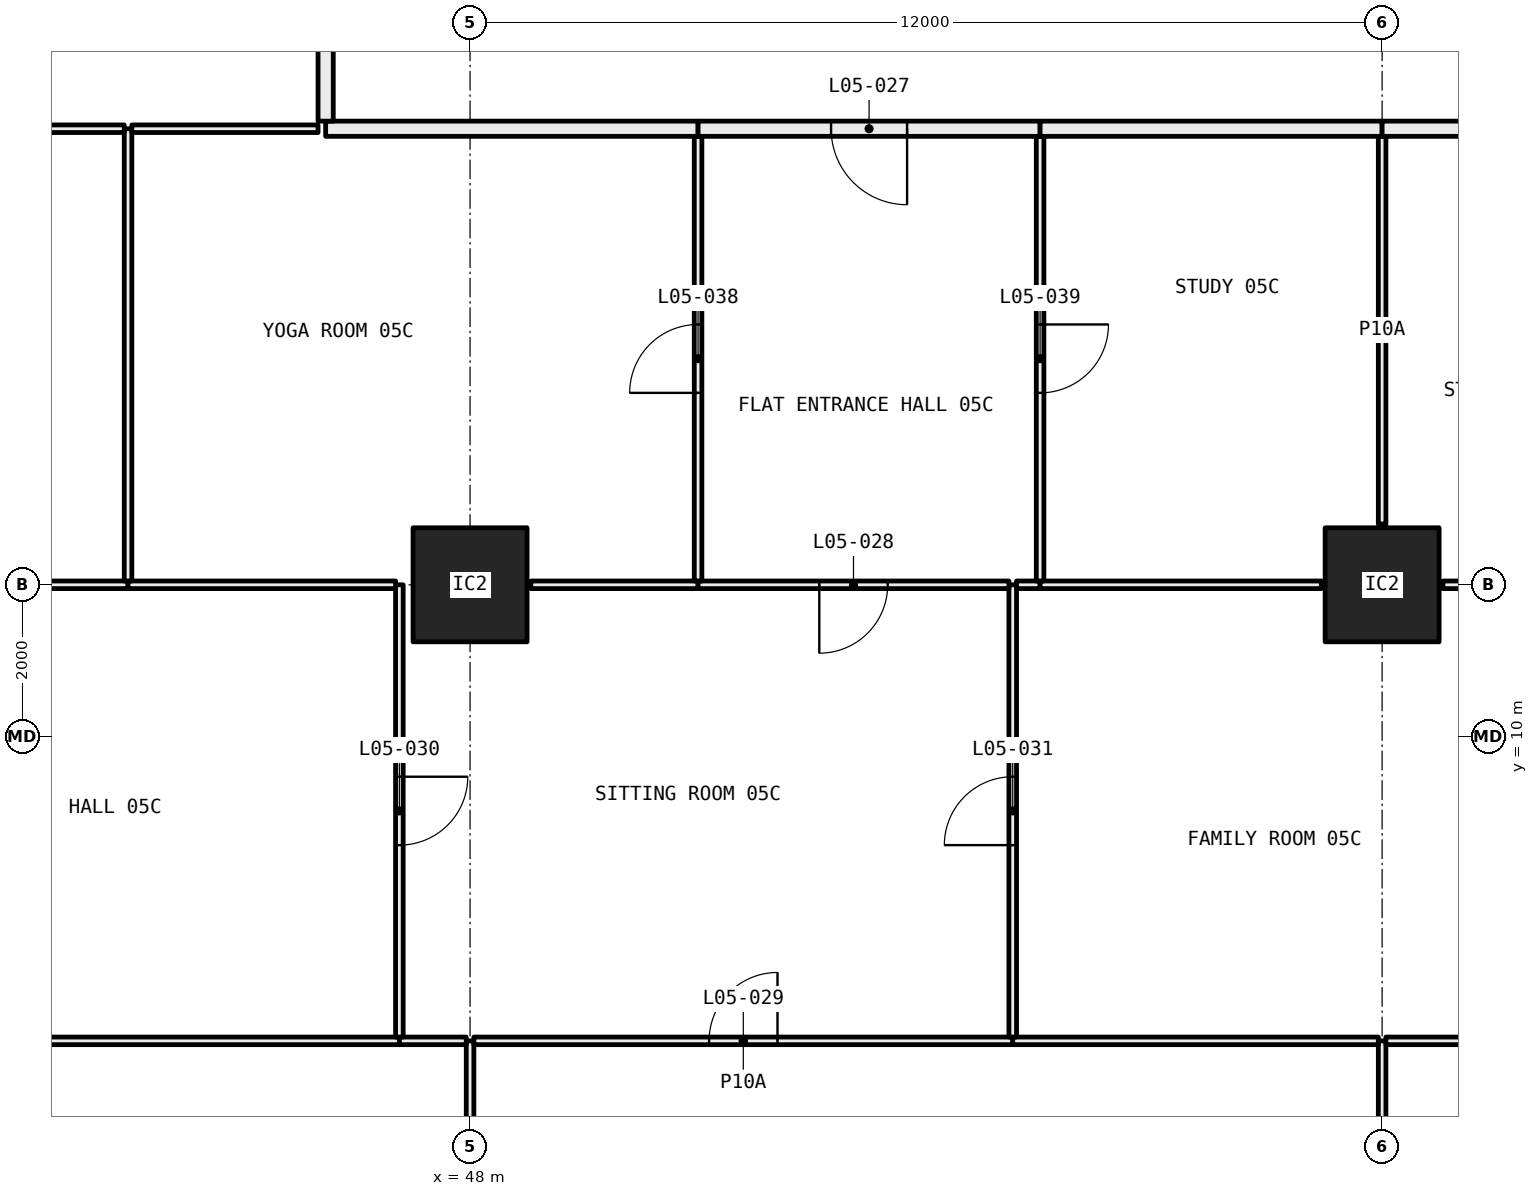
"""IFC4 building model, lengths in metres.
Left out: names, types, materials, properties, quantities, classifications, styles, units other than length and angle.
Written with IfcOpenShell. Run it as: python <this file> out.ifc"""

import sys

from ifc_helpers import new_model, si_unit, direction, frame, frame_2d, origin, origin_2d, place, context, subcontext, project, spatial, rectangle, hollow_rectangle, extrude, element, fill, save


model = new_model("IFC4")
c1 = context("Model", 3, precision=1e-05, world=origin(), true_north=direction((0.0, 1.0)))
c2 = subcontext(c1, "Body", "Model", "MODEL_VIEW")
j1 = project(units=[si_unit("LENGTHUNIT", "METRE"), si_unit("PLANEANGLEUNIT", "RADIAN")], contexts=[c1])
p1 = place(None, origin())
s1 = spatial("IfcSite", under=j1, at=p1, CompositionType="ELEMENT")
p2 = place(p1, origin())
s2 = spatial("IfcBuilding", under=s1, at=p2, CompositionType="ELEMENT")
p3 = place(p2, frame((0.0, 0.0, 30.0)))
s3 = spatial("IfcBuildingStorey", under=s2, at=p3, CompositionType="ELEMENT", Elevation=30.0)
for number, where, z_axis, x_axis in (
    (1, (48.0, 12.0, 0.0), (0.0, 0.0, 1.0), (1.0, 0.0, 0.0)),
    (2, (60.0, 12.0, 0.0), (0.0, 0.0, 1.0), (1.0, 0.0, 0.0)),
):
    element("IfcColumn", number, at=place(p3, frame(where, z_axis=z_axis, x_axis=x_axis)), inside=s3, PredefinedType="COLUMN", context=c2, shape_type="SweptSolid", body=[
        extrude(hollow_rectangle(XDim=1.5, YDim=1.5, WallThickness=0.065, at=origin_2d()), origin(), (0.0, 0.0, 1.0), 3.05),
    ])
p4 = place(p3, frame((48.0, 0.72, 0.0), z_axis=(0.0, 0.0, 1.0), x_axis=(0.0, 1.0, 0.0)))
e3 = element("IfcWall", 3, at=p4, inside=s3, PredefinedType="PARTITIONING", context=c2, shape_type="SweptSolid", body=[
    extrude(rectangle(XDim=5.28, YDim=0.1, at=frame_2d((2.64, 0.0))), origin(), (0.0, 0.0, 1.0), 2.45),
])
p5 = place(p4, frame((2.19, 0.0, 0.0)))
e4 = element("IfcOpeningElement", 4, at=p5, cuts=e3, PredefinedType="OPENING", context=c2, shape_type="SweptSolid", body=[
    extrude(rectangle(XDim=0.9, YDim=2.1, at=frame_2d((0.45, 1.05))), frame((0.0, 0.06, 0.0), z_axis=(0.0, -1.0, 0.0), x_axis=(1.0, 0.0, 0.0)), (0.0, 0.0, 1.0), 0.12),
])
p6 = place(p3, frame((47.07, 6.0, 0.0), z_axis=(0.0, 0.0, 1.0), x_axis=(-1.0, 0.0, 0.0)))
e5 = element("IfcWall", 5, at=p6, inside=s3, PredefinedType="PARTITIONING", context=c2, shape_type="SweptSolid", body=[
    extrude(rectangle(XDim=5.02, YDim=0.1, at=frame_2d((2.51, 0.0))), origin(), (0.0, 0.0, 1.0), 3.05),
])
p7 = place(p3, frame((47.95, 6.0, 0.0), z_axis=(0.0, 0.0, 1.0), x_axis=(-1.0, 0.0, 0.0)))
e6 = element("IfcWall", 6, at=p7, inside=s3, PredefinedType="PARTITIONING", context=c2, shape_type="SweptSolid", body=[
    extrude(rectangle(XDim=0.88, YDim=0.1, at=frame_2d((0.44, 0.0))), origin(), (0.0, 0.0, 1.0), 2.45),
])
p8 = place(p3, frame((60.0, 0.72, 0.0), z_axis=(0.0, 0.0, 1.0), x_axis=(0.0, 1.0, 0.0)))
e7 = element("IfcWall", 7, at=p8, inside=s3, PredefinedType="PARTITIONING", context=c2, shape_type="SweptSolid", body=[
    extrude(rectangle(XDim=5.28, YDim=0.1, at=frame_2d((2.64, 0.0))), origin(), (0.0, 0.0, 1.0), 2.45),
])
p9 = place(p8, frame((2.19, 0.0, 0.0)))
e8 = element("IfcOpeningElement", 8, at=p9, cuts=e7, PredefinedType="OPENING", context=c2, shape_type="SweptSolid", body=[
    extrude(rectangle(XDim=0.9, YDim=2.1, at=frame_2d((0.45, 1.05))), frame((0.0, 0.06, 0.0), z_axis=(0.0, -1.0, 0.0), x_axis=(1.0, 0.0, 0.0)), (0.0, 0.0, 1.0), 0.12),
])
p10 = place(p3, frame((55.14, 6.0, 0.0), z_axis=(0.0, 0.0, 1.0), x_axis=(-1.0, 0.0, 0.0)))
e9 = element("IfcWall", 9, at=p10, inside=s3, PredefinedType="PARTITIONING", context=c2, shape_type="SweptSolid", body=[
    extrude(rectangle(XDim=7.09, YDim=0.1, at=frame_2d((3.545, 0.0))), origin(), (0.0, 0.0, 1.0), 2.45),
])
p11 = place(p10, frame((3.095, 0.0, 0.0)))
e10 = element("IfcOpeningElement", 10, at=p11, cuts=e9, PredefinedType="OPENING", context=c2, shape_type="SweptSolid", body=[
    extrude(rectangle(XDim=0.9, YDim=2.1, at=frame_2d((0.45, 1.05))), frame((0.0, 0.06, 0.0), z_axis=(0.0, -1.0, 0.0), x_axis=(1.0, 0.0, 0.0)), (0.0, 0.0, 1.0), 0.12),
])
p12 = place(p3, frame((59.95, 6.0, 0.0), z_axis=(0.0, 0.0, 1.0), x_axis=(-1.0, 0.0, 0.0)))
e11 = element("IfcWall", 11, at=p12, inside=s3, PredefinedType="PARTITIONING", context=c2, shape_type="SweptSolid", body=[
    extrude(rectangle(XDim=4.81, YDim=0.1, at=frame_2d((2.405, 0.0))), origin(), (0.0, 0.0, 1.0), 2.45),
])
p13 = place(p3, frame((63.21, 6.0, 0.0), z_axis=(0.0, 0.0, 1.0), x_axis=(-1.0, 0.0, 0.0)))
e12 = element("IfcWall", 12, at=p13, inside=s3, PredefinedType="PARTITIONING", context=c2, shape_type="SweptSolid", body=[
    extrude(rectangle(XDim=3.16, YDim=0.1, at=frame_2d((1.58, 0.0))), origin(), (0.0, 0.0, 1.0), 2.45),
])
p14 = place(p3, frame((47.07, 6.05, 0.0), z_axis=(0.0, 0.0, 1.0), x_axis=(0.0, 1.0, 0.0)))
e13 = element("IfcWall", 13, at=p14, inside=s3, PredefinedType="PARTITIONING", context=c2, shape_type="SweptSolid", body=[
    extrude(rectangle(XDim=5.95, YDim=0.1, at=frame_2d((2.975, 0.0))), origin(), (0.0, 0.0, 1.0), 2.45),
])
p15 = place(p14, frame((2.525, 0.0, 0.0)))
e14 = element("IfcOpeningElement", 14, at=p15, cuts=e13, PredefinedType="OPENING", context=c2, shape_type="SweptSolid", body=[
    extrude(rectangle(XDim=0.9, YDim=2.1, at=frame_2d((0.45, 1.05))), frame((0.0, 0.06, 0.0), z_axis=(0.0, -1.0, 0.0), x_axis=(1.0, 0.0, 0.0)), (0.0, 0.0, 1.0), 0.12),
])
p16 = place(p3, frame((43.5, 12.0, 0.0), z_axis=(0.0, 0.0, 1.0), x_axis=(-1.0, 0.0, 0.0)))
e15 = element("IfcWall", 15, at=p16, inside=s3, PredefinedType="PARTITIONING", context=c2, shape_type="SweptSolid", body=[
    extrude(rectangle(XDim=4.45, YDim=0.1, at=frame_2d((2.225, 0.0))), origin(), (0.0, 0.0, 1.0), 2.45),
])
p17 = place(p16, frame((1.775, 0.0, 0.0)))
e16 = element("IfcOpeningElement", 16, at=p17, cuts=e15, PredefinedType="OPENING", context=c2, shape_type="SweptSolid", body=[
    extrude(rectangle(XDim=0.9, YDim=2.1, at=frame_2d((0.45, 1.05))), frame((0.0, 0.06, 0.0), z_axis=(0.0, -1.0, 0.0), x_axis=(1.0, 0.0, 0.0)), (0.0, 0.0, 1.0), 0.12),
])
p18 = place(p3, frame((47.02, 12.0, 0.0), z_axis=(0.0, 0.0, 1.0), x_axis=(-1.0, 0.0, 0.0)))
e17 = element("IfcWall", 17, at=p18, inside=s3, PredefinedType="PARTITIONING", context=c2, shape_type="SweptSolid", body=[
    extrude(rectangle(XDim=3.52, YDim=0.1, at=frame_2d((1.76, 0.0))), origin(), (0.0, 0.0, 1.0), 2.45),
])
p19 = place(p3, frame((55.14, 6.05, 0.0), z_axis=(0.0, 0.0, 1.0), x_axis=(0.0, 1.0, 0.0)))
e18 = element("IfcWall", 18, at=p19, inside=s3, PredefinedType="PARTITIONING", context=c2, shape_type="SweptSolid", body=[
    extrude(rectangle(XDim=5.95, YDim=0.1, at=frame_2d((2.975, 0.0))), origin(), (0.0, 0.0, 1.0), 2.45),
])
p20 = place(p19, frame((2.525, 0.0, 0.0)))
e19 = element("IfcOpeningElement", 19, at=p20, cuts=e18, PredefinedType="OPENING", context=c2, shape_type="SweptSolid", body=[
    extrude(rectangle(XDim=0.9, YDim=2.1, at=frame_2d((0.45, 1.05))), frame((0.0, 0.06, 0.0), z_axis=(0.0, -1.0, 0.0), x_axis=(1.0, 0.0, 0.0)), (0.0, 0.0, 1.0), 0.12),
])
p21 = place(p3, frame((51.0, 12.0, 0.0), z_axis=(0.0, 0.0, 1.0), x_axis=(-1.0, 0.0, 0.0)))
e20 = element("IfcWall", 20, at=p21, inside=s3, PredefinedType="PARTITIONING", context=c2, shape_type="SweptSolid", body=[
    extrude(rectangle(XDim=2.2, YDim=0.1, at=frame_2d((1.1, 0.0))), origin(), (0.0, 0.0, 1.0), 2.45),
])
p22 = place(p3, frame((55.09, 12.0, 0.0), z_axis=(0.0, 0.0, 1.0), x_axis=(-1.0, 0.0, 0.0)))
e21 = element("IfcWall", 21, at=p22, inside=s3, PredefinedType="PARTITIONING", context=c2, shape_type="SweptSolid", body=[
    extrude(rectangle(XDim=4.09, YDim=0.1, at=frame_2d((2.045, 0.0))), origin(), (0.0, 0.0, 1.0), 2.45),
])
p23 = place(p22, frame((1.595, 0.0, 0.0)))
e22 = element("IfcOpeningElement", 22, at=p23, cuts=e21, PredefinedType="OPENING", context=c2, shape_type="SweptSolid", body=[
    extrude(rectangle(XDim=0.9, YDim=2.1, at=frame_2d((0.45, 1.05))), frame((0.0, 0.06, 0.0), z_axis=(0.0, -1.0, 0.0), x_axis=(1.0, 0.0, 0.0)), (0.0, 0.0, 1.0), 0.12),
])
p24 = place(p3, frame((55.5, 12.0, 0.0), z_axis=(0.0, 0.0, 1.0), x_axis=(-1.0, 0.0, 0.0)))
e23 = element("IfcWall", 23, at=p24, inside=s3, PredefinedType="PARTITIONING", context=c2, shape_type="SweptSolid", body=[
    extrude(rectangle(XDim=0.31, YDim=0.1, at=frame_2d((0.155, 0.0))), origin(), (0.0, 0.0, 1.0), 2.45),
])
p25 = place(p3, frame((59.2, 12.0, 0.0), z_axis=(0.0, 0.0, 1.0), x_axis=(-1.0, 0.0, 0.0)))
e24 = element("IfcWall", 24, at=p25, inside=s3, PredefinedType="PARTITIONING", context=c2, shape_type="SweptSolid", body=[
    extrude(rectangle(XDim=3.7, YDim=0.1, at=frame_2d((1.85, 0.0))), origin(), (0.0, 0.0, 1.0), 2.45),
])
p26 = place(p3, frame((62.925, 12.0, 0.0), z_axis=(0.0, 0.0, 1.0), x_axis=(-1.0, 0.0, 0.0)))
e25 = element("IfcWall", 25, at=p26, inside=s3, PredefinedType="PARTITIONING", context=c2, shape_type="SweptSolid", body=[
    extrude(rectangle(XDim=2.125, YDim=0.1, at=frame_2d((1.062, 0.0))), origin(), (0.0, 0.0, 1.0), 2.45),
])
p27 = place(p26, frame((0.613, 0.0, 0.0)))
e26 = element("IfcOpeningElement", 26, at=p27, cuts=e25, PredefinedType="OPENING", context=c2, shape_type="SweptSolid", body=[
    extrude(rectangle(XDim=0.9, YDim=2.1, at=frame_2d((0.45, 1.05))), frame((0.0, 0.06, 0.0), z_axis=(0.0, -1.0, 0.0), x_axis=(1.0, 0.0, 0.0)), (0.0, 0.0, 1.0), 0.12),
])
p28 = place(p3, frame((43.5, 12.05, 0.0), z_axis=(0.0, 0.0, 1.0), x_axis=(0.0, 1.0, 0.0)))
e27 = element("IfcWall", 27, at=p28, inside=s3, PredefinedType="PARTITIONING", context=c2, shape_type="SweptSolid", body=[
    extrude(rectangle(XDim=5.95, YDim=0.1, at=frame_2d((2.975, 0.0))), origin(), (0.0, 0.0, 1.0), 2.45),
])
p29 = place(p3, frame((43.45, 18.0, 0.0), z_axis=(0.0, 0.0, 1.0), x_axis=(-1.0, 0.0, 0.0)))
e28 = element("IfcWall", 28, at=p29, inside=s3, PredefinedType="PARTITIONING", context=c2, shape_type="SweptSolid", body=[
    extrude(rectangle(XDim=2.95, YDim=0.1, at=frame_2d((1.475, 0.0))), origin(), (0.0, 0.0, 1.0), 3.05),
])
p30 = place(p3, frame((51.0, 12.05, 0.0), z_axis=(0.0, 0.0, 1.0), x_axis=(0.0, 1.0, 0.0)))
e29 = element("IfcWall", 29, at=p30, inside=s3, PredefinedType="PARTITIONING", context=c2, shape_type="SweptSolid", body=[
    extrude(rectangle(XDim=5.85, YDim=0.1, at=frame_2d((2.925, 0.0))), origin(), (0.0, 0.0, 1.0), 2.45),
])
p31 = place(p30, frame((2.475, 0.0, 0.0)))
e30 = element("IfcOpeningElement", 30, at=p31, cuts=e29, PredefinedType="OPENING", context=c2, shape_type="SweptSolid", body=[
    extrude(rectangle(XDim=0.9, YDim=2.1, at=frame_2d((0.45, 1.05))), frame((0.0, 0.06, 0.0), z_axis=(0.0, -1.0, 0.0), x_axis=(1.0, 0.0, 0.0)), (0.0, 0.0, 1.0), 0.12),
])
p32 = place(p3, frame((46.0, 18.0, 0.0), z_axis=(0.0, 0.0, 1.0), x_axis=(-1.0, 0.0, 0.0)))
e31 = element("IfcWall", 31, at=p32, inside=s3, PredefinedType="PARTITIONING", context=c2, shape_type="SweptSolid", body=[
    extrude(rectangle(XDim=2.45, YDim=0.1, at=frame_2d((1.225, 0.0))), origin(), (0.0, 0.0, 1.0), 3.05),
])
p33 = place(p3, frame((51.0, 18.0, 0.0), z_axis=(0.0, 0.0, 1.0), x_axis=(-1.0, 0.0, 0.0)))
e32 = element("IfcWall", 32, at=p33, inside=s3, PredefinedType="PARTITIONING", context=c2, shape_type="SweptSolid", body=[
    extrude(rectangle(XDim=4.9, YDim=0.2, at=frame_2d((2.45, 0.0))), origin(), (0.0, 0.0, 1.0), 3.05),
])
p34 = place(p3, frame((55.5, 12.05, 0.0), z_axis=(0.0, 0.0, 1.0), x_axis=(0.0, 1.0, 0.0)))
e33 = element("IfcWall", 33, at=p34, inside=s3, PredefinedType="PARTITIONING", context=c2, shape_type="SweptSolid", body=[
    extrude(rectangle(XDim=5.85, YDim=0.1, at=frame_2d((2.925, 0.0))), origin(), (0.0, 0.0, 1.0), 2.45),
])
p35 = place(p34, frame((2.475, 0.0, 0.0)))
e34 = element("IfcOpeningElement", 34, at=p35, cuts=e33, PredefinedType="OPENING", context=c2, shape_type="SweptSolid", body=[
    extrude(rectangle(XDim=0.9, YDim=2.1, at=frame_2d((0.45, 1.05))), frame((0.0, 0.06, 0.0), z_axis=(0.0, -1.0, 0.0), x_axis=(1.0, 0.0, 0.0)), (0.0, 0.0, 1.0), 0.12),
])
p36 = place(p3, frame((55.5, 18.0, 0.0), z_axis=(0.0, 0.0, 1.0), x_axis=(-1.0, 0.0, 0.0)))
e35 = element("IfcWall", 35, at=p36, inside=s3, PredefinedType="PARTITIONING", context=c2, shape_type="SweptSolid", body=[
    extrude(rectangle(XDim=4.5, YDim=0.2, at=frame_2d((2.25, 0.0))), origin(), (0.0, 0.0, 1.0), 3.05),
])
p37 = place(p36, frame((1.75, 0.0, 0.0)))
e36 = element("IfcOpeningElement", 36, at=p37, cuts=e35, PredefinedType="OPENING", context=c2, shape_type="SweptSolid", body=[
    extrude(rectangle(XDim=1.0, YDim=2.1, at=frame_2d((0.5, 1.05))), frame((0.0, 0.11, 0.0), z_axis=(0.0, -1.0, 0.0), x_axis=(1.0, 0.0, 0.0)), (0.0, 0.0, 1.0), 0.22),
])
p38 = place(p3, frame((60.0, 12.8, 0.0), z_axis=(0.0, 0.0, 1.0), x_axis=(0.0, 1.0, 0.0)))
e37 = element("IfcWall", 37, at=p38, inside=s3, PredefinedType="PARTITIONING", context=c2, shape_type="SweptSolid", body=[
    extrude(rectangle(XDim=5.1, YDim=0.1, at=frame_2d((2.55, 0.0))), origin(), (0.0, 0.0, 1.0), 3.05),
])
p39 = place(p3, frame((60.0, 18.0, 0.0), z_axis=(0.0, 0.0, 1.0), x_axis=(-1.0, 0.0, 0.0)))
e38 = element("IfcWall", 38, at=p39, inside=s3, PredefinedType="PARTITIONING", context=c2, shape_type="SweptSolid", body=[
    extrude(rectangle(XDim=4.5, YDim=0.2, at=frame_2d((2.25, 0.0))), origin(), (0.0, 0.0, 1.0), 3.05),
])
p40 = place(p3, frame((61.9, 18.0, 0.0), z_axis=(0.0, 0.0, 1.0), x_axis=(-1.0, 0.0, 0.0)))
e39 = element("IfcWall", 39, at=p40, inside=s3, PredefinedType="PARTITIONING", context=c2, shape_type="SweptSolid", body=[
    extrude(rectangle(XDim=1.9, YDim=0.2, at=frame_2d((0.95, 0.0))), origin(), (0.0, 0.0, 1.0), 3.05),
])
p41 = place(p3, frame((46.1, 18.1, 0.0), z_axis=(0.0, 0.0, 1.0), x_axis=(0.0, 1.0, 0.0)))
e40 = element("IfcWall", 40, at=p41, inside=s3, PredefinedType="PARTITIONING", context=c2, shape_type="SweptSolid", body=[
    extrude(rectangle(XDim=6.2, YDim=0.2, at=frame_2d((3.1, 0.0))), origin(), (0.0, 0.0, 1.0), 2.45),
])
p42 = place(p37, origin())
e41 = element("IfcDoor", 41, at=p42, inside=s3, OperationType="SINGLE_SWING_RIGHT", PredefinedType="DOOR", context=c2, shape_type="SweptSolid", body=[
    extrude(rectangle(XDim=1.0, YDim=2.1, at=frame_2d((0.5, 1.05))), frame((0.0, 0.025, 0.0), z_axis=(0.0, -1.0, 0.0), x_axis=(1.0, 0.0, 0.0)), (0.0, 0.0, 1.0), 0.05),
])
fill(e36, e41)
p43 = place(p23, origin())
e42 = element("IfcDoor", 42, at=p43, inside=s3, OperationType="SINGLE_SWING_LEFT", PredefinedType="DOOR", context=c2, shape_type="SweptSolid", body=[
    extrude(rectangle(XDim=0.9, YDim=2.1, at=frame_2d((0.45, 1.05))), frame((0.0, 0.025, 0.0), z_axis=(0.0, -1.0, 0.0), x_axis=(1.0, 0.0, 0.0)), (0.0, 0.0, 1.0), 0.05),
])
fill(e22, e42)
p44 = place(p11, frame((0.9, 0.0, 0.0), x_axis=(-1.0, 0.0, 0.0)))
e43 = element("IfcDoor", 43, at=p44, inside=s3, OperationType="SINGLE_SWING_LEFT", PredefinedType="DOOR", context=c2, shape_type="SweptSolid", body=[
    extrude(rectangle(XDim=0.9, YDim=2.1, at=frame_2d((0.45, 1.05))), frame((0.0, 0.025, 0.0), z_axis=(0.0, -1.0, 0.0), x_axis=(1.0, 0.0, 0.0)), (0.0, 0.0, 1.0), 0.05),
])
fill(e10, e43)
p45 = place(p15, frame((0.9, 0.0, 0.0), x_axis=(-1.0, 0.0, 0.0)))
e44 = element("IfcDoor", 44, at=p45, inside=s3, OperationType="SINGLE_SWING_RIGHT", PredefinedType="DOOR", context=c2, shape_type="SweptSolid", body=[
    extrude(rectangle(XDim=0.9, YDim=2.1, at=frame_2d((0.45, 1.05))), frame((0.0, 0.025, 0.0), z_axis=(0.0, -1.0, 0.0), x_axis=(1.0, 0.0, 0.0)), (0.0, 0.0, 1.0), 0.05),
])
fill(e14, e44)
p46 = place(p20, origin())
e45 = element("IfcDoor", 45, at=p46, inside=s3, OperationType="SINGLE_SWING_RIGHT", PredefinedType="DOOR", context=c2, shape_type="SweptSolid", body=[
    extrude(rectangle(XDim=0.9, YDim=2.1, at=frame_2d((0.45, 1.05))), frame((0.0, 0.025, 0.0), z_axis=(0.0, -1.0, 0.0), x_axis=(1.0, 0.0, 0.0)), (0.0, 0.0, 1.0), 0.05),
])
fill(e19, e45)
p47 = place(p31, origin())
e46 = element("IfcDoor", 46, at=p47, inside=s3, OperationType="SINGLE_SWING_RIGHT", PredefinedType="DOOR", context=c2, shape_type="SweptSolid", body=[
    extrude(rectangle(XDim=0.9, YDim=2.1, at=frame_2d((0.45, 1.05))), frame((0.0, 0.025, 0.0), z_axis=(0.0, -1.0, 0.0), x_axis=(1.0, 0.0, 0.0)), (0.0, 0.0, 1.0), 0.05),
])
fill(e30, e46)
p48 = place(p35, frame((0.9, 0.0, 0.0), x_axis=(-1.0, 0.0, 0.0)))
e47 = element("IfcDoor", 47, at=p48, inside=s3, OperationType="SINGLE_SWING_RIGHT", PredefinedType="DOOR", context=c2, shape_type="SweptSolid", body=[
    extrude(rectangle(XDim=0.9, YDim=2.1, at=frame_2d((0.45, 1.05))), frame((0.0, 0.025, 0.0), z_axis=(0.0, -1.0, 0.0), x_axis=(1.0, 0.0, 0.0)), (0.0, 0.0, 1.0), 0.05),
])
fill(e34, e47)
save(model, sys.argv[1])
